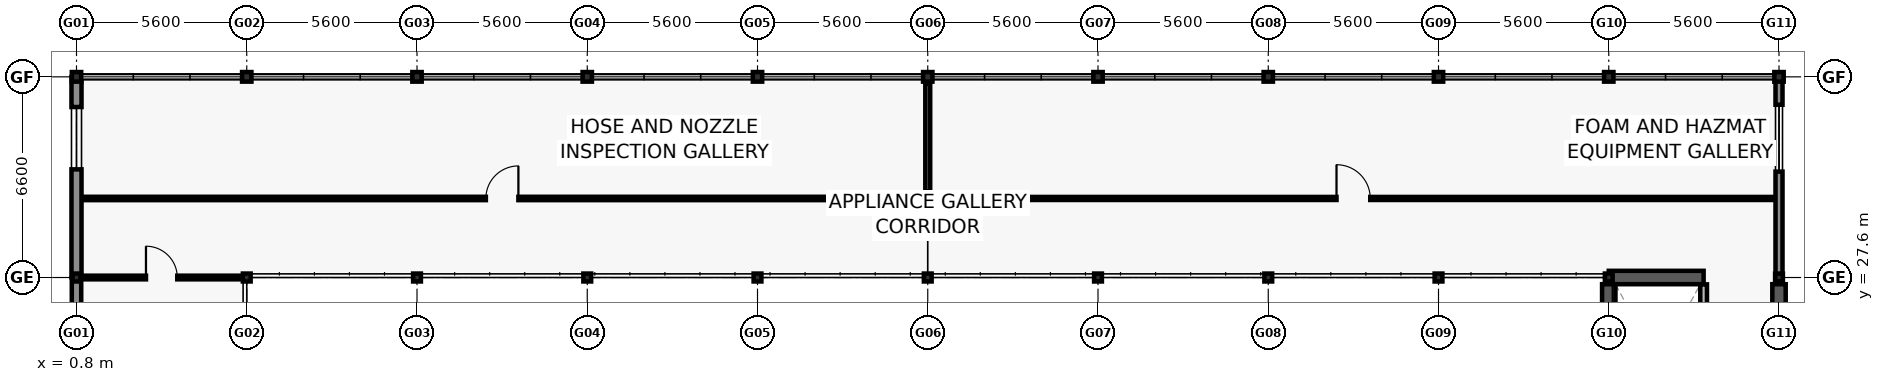
"""IFC4 building model, lengths in metres.
Left out: names, types, materials, properties, quantities, classifications, styles, units other than length and angle.
Written with IfcOpenShell. Run it as: python <this file> out.ifc"""

import sys

from ifc_helpers import new_model, si_unit, direction, frame, frame_2d, origin, origin_2d, place, context, subcontext, project, spatial, rectangle, i_section, extrude, element, fill, save


model = new_model("IFC4")
c1 = context("Model", 3, precision=1e-05, world=origin(), true_north=direction((0.0, 1.0)))
c2 = subcontext(c1, "Body", "Model", "MODEL_VIEW")
j1 = project(units=[si_unit("LENGTHUNIT", "METRE"), si_unit("PLANEANGLEUNIT", "RADIAN")], contexts=[c1])
p1 = place(None, origin())
s1 = spatial("IfcSite", under=j1, at=p1, CompositionType="ELEMENT")
p2 = place(p1, origin())
s2 = spatial("IfcBuilding", under=s1, at=p2, CompositionType="ELEMENT")
p3 = place(p2, frame((0.0, 0.0, 5.4)))
s3 = spatial("IfcBuildingStorey", under=s2, at=p3, CompositionType="ELEMENT", Elevation=5.4)
p4 = place(p3, frame((0.8, 27.6, 0.0), z_axis=(0.0, 0.0, 1.0), x_axis=(1.0, 0.0, 0.0)))
e1 = element("IfcColumn", 1, at=p4, inside=s3, PredefinedType="COLUMN", context=c2, shape_type="SweptSolid", body=[
    extrude(i_section(OverallWidth=0.256, OverallDepth=0.26, WebThickness=0.01, FlangeThickness=0.017, FilletRadius=0.013, at=origin_2d()), origin(), (0.0, 0.0, 1.0), 4.2),
])
p5 = place(p3, frame((0.8, 34.2, 0.0), z_axis=(0.0, 0.0, 1.0), x_axis=(1.0, 0.0, 0.0)))
e2 = element("IfcColumn", 2, at=p5, inside=s3, PredefinedType="COLUMN", context=c2, shape_type="SweptSolid", body=[
    extrude(i_section(OverallWidth=0.307, OverallDepth=0.315, WebThickness=0.012, FlangeThickness=0.019, FilletRadius=0.017, at=origin_2d()), origin(), (0.0, 0.0, 1.0), 4.2),
])
p6 = place(p3, frame((6.4, 27.6, 0.0), z_axis=(0.0, 0.0, 1.0), x_axis=(1.0, 0.0, 0.0)))
e3 = element("IfcColumn", 3, at=p6, inside=s3, PredefinedType="COLUMN", context=c2, shape_type="SweptSolid", body=[
    extrude(i_section(OverallWidth=0.256, OverallDepth=0.26, WebThickness=0.01, FlangeThickness=0.017, FilletRadius=0.013, at=origin_2d()), origin(), (0.0, 0.0, 1.0), 4.2),
])
p7 = place(p3, frame((6.4, 34.2, 0.0), z_axis=(0.0, 0.0, 1.0), x_axis=(1.0, 0.0, 0.0)))
e4 = element("IfcColumn", 4, at=p7, inside=s3, PredefinedType="COLUMN", context=c2, shape_type="SweptSolid", body=[
    extrude(i_section(OverallWidth=0.307, OverallDepth=0.315, WebThickness=0.012, FlangeThickness=0.019, FilletRadius=0.017, at=origin_2d()), origin(), (0.0, 0.0, 1.0), 4.2),
])
p8 = place(p3, frame((12.0, 27.6, 0.0), z_axis=(0.0, 0.0, 1.0), x_axis=(1.0, 0.0, 0.0)))
e5 = element("IfcColumn", 5, at=p8, inside=s3, PredefinedType="COLUMN", context=c2, shape_type="SweptSolid", body=[
    extrude(i_section(OverallWidth=0.256, OverallDepth=0.26, WebThickness=0.01, FlangeThickness=0.017, FilletRadius=0.013, at=origin_2d()), origin(), (0.0, 0.0, 1.0), 4.2),
])
p9 = place(p3, frame((12.0, 34.2, 0.0), z_axis=(0.0, 0.0, 1.0), x_axis=(1.0, 0.0, 0.0)))
e6 = element("IfcColumn", 6, at=p9, inside=s3, PredefinedType="COLUMN", context=c2, shape_type="SweptSolid", body=[
    extrude(i_section(OverallWidth=0.307, OverallDepth=0.315, WebThickness=0.012, FlangeThickness=0.019, FilletRadius=0.017, at=origin_2d()), origin(), (0.0, 0.0, 1.0), 4.2),
])
p10 = place(p3, frame((17.6, 27.6, 0.0), z_axis=(0.0, 0.0, 1.0), x_axis=(1.0, 0.0, 0.0)))
e7 = element("IfcColumn", 7, at=p10, inside=s3, PredefinedType="COLUMN", context=c2, shape_type="SweptSolid", body=[
    extrude(i_section(OverallWidth=0.256, OverallDepth=0.26, WebThickness=0.01, FlangeThickness=0.017, FilletRadius=0.013, at=origin_2d()), origin(), (0.0, 0.0, 1.0), 4.2),
])
p11 = place(p3, frame((17.6, 34.2, 0.0), z_axis=(0.0, 0.0, 1.0), x_axis=(1.0, 0.0, 0.0)))
e8 = element("IfcColumn", 8, at=p11, inside=s3, PredefinedType="COLUMN", context=c2, shape_type="SweptSolid", body=[
    extrude(i_section(OverallWidth=0.307, OverallDepth=0.315, WebThickness=0.012, FlangeThickness=0.019, FilletRadius=0.017, at=origin_2d()), origin(), (0.0, 0.0, 1.0), 4.2),
])
p12 = place(p3, frame((23.2, 27.6, 0.0), z_axis=(0.0, 0.0, 1.0), x_axis=(1.0, 0.0, 0.0)))
e9 = element("IfcColumn", 9, at=p12, inside=s3, PredefinedType="COLUMN", context=c2, shape_type="SweptSolid", body=[
    extrude(i_section(OverallWidth=0.256, OverallDepth=0.26, WebThickness=0.01, FlangeThickness=0.017, FilletRadius=0.013, at=origin_2d()), origin(), (0.0, 0.0, 1.0), 4.2),
])
p13 = place(p3, frame((23.2, 34.2, 0.0), z_axis=(0.0, 0.0, 1.0), x_axis=(1.0, 0.0, 0.0)))
e10 = element("IfcColumn", 10, at=p13, inside=s3, PredefinedType="COLUMN", context=c2, shape_type="SweptSolid", body=[
    extrude(i_section(OverallWidth=0.307, OverallDepth=0.315, WebThickness=0.012, FlangeThickness=0.019, FilletRadius=0.017, at=origin_2d()), origin(), (0.0, 0.0, 1.0), 4.2),
])
p14 = place(p3, frame((28.8, 27.6, 0.0), z_axis=(0.0, 0.0, 1.0), x_axis=(1.0, 0.0, 0.0)))
e11 = element("IfcColumn", 11, at=p14, inside=s3, PredefinedType="COLUMN", context=c2, shape_type="SweptSolid", body=[
    extrude(i_section(OverallWidth=0.256, OverallDepth=0.26, WebThickness=0.01, FlangeThickness=0.017, FilletRadius=0.013, at=origin_2d()), origin(), (0.0, 0.0, 1.0), 4.2),
])
p15 = place(p3, frame((28.8, 34.2, 0.0), z_axis=(0.0, 0.0, 1.0), x_axis=(1.0, 0.0, 0.0)))
e12 = element("IfcColumn", 12, at=p15, inside=s3, PredefinedType="COLUMN", context=c2, shape_type="SweptSolid", body=[
    extrude(i_section(OverallWidth=0.307, OverallDepth=0.315, WebThickness=0.012, FlangeThickness=0.019, FilletRadius=0.017, at=origin_2d()), origin(), (0.0, 0.0, 1.0), 4.2),
])
p16 = place(p3, frame((34.4, 27.6, 0.0), z_axis=(0.0, 0.0, 1.0), x_axis=(1.0, 0.0, 0.0)))
e13 = element("IfcColumn", 13, at=p16, inside=s3, PredefinedType="COLUMN", context=c2, shape_type="SweptSolid", body=[
    extrude(i_section(OverallWidth=0.256, OverallDepth=0.26, WebThickness=0.01, FlangeThickness=0.017, FilletRadius=0.013, at=origin_2d()), origin(), (0.0, 0.0, 1.0), 4.2),
])
p17 = place(p3, frame((34.4, 34.2, 0.0), z_axis=(0.0, 0.0, 1.0), x_axis=(1.0, 0.0, 0.0)))
e14 = element("IfcColumn", 14, at=p17, inside=s3, PredefinedType="COLUMN", context=c2, shape_type="SweptSolid", body=[
    extrude(i_section(OverallWidth=0.307, OverallDepth=0.315, WebThickness=0.012, FlangeThickness=0.019, FilletRadius=0.017, at=origin_2d()), origin(), (0.0, 0.0, 1.0), 4.2),
])
p18 = place(p3, frame((40.0, 27.6, 0.0), z_axis=(0.0, 0.0, 1.0), x_axis=(1.0, 0.0, 0.0)))
e15 = element("IfcColumn", 15, at=p18, inside=s3, PredefinedType="COLUMN", context=c2, shape_type="SweptSolid", body=[
    extrude(i_section(OverallWidth=0.256, OverallDepth=0.26, WebThickness=0.01, FlangeThickness=0.017, FilletRadius=0.013, at=origin_2d()), origin(), (0.0, 0.0, 1.0), 4.2),
])
p19 = place(p3, frame((40.0, 34.2, 0.0), z_axis=(0.0, 0.0, 1.0), x_axis=(1.0, 0.0, 0.0)))
e16 = element("IfcColumn", 16, at=p19, inside=s3, PredefinedType="COLUMN", context=c2, shape_type="SweptSolid", body=[
    extrude(i_section(OverallWidth=0.307, OverallDepth=0.315, WebThickness=0.012, FlangeThickness=0.019, FilletRadius=0.017, at=origin_2d()), origin(), (0.0, 0.0, 1.0), 4.2),
])
p20 = place(p3, frame((45.6, 27.6, 0.0), z_axis=(0.0, 0.0, 1.0), x_axis=(1.0, 0.0, 0.0)))
e17 = element("IfcColumn", 17, at=p20, inside=s3, PredefinedType="COLUMN", context=c2, shape_type="SweptSolid", body=[
    extrude(i_section(OverallWidth=0.256, OverallDepth=0.26, WebThickness=0.01, FlangeThickness=0.017, FilletRadius=0.013, at=origin_2d()), origin(), (0.0, 0.0, 1.0), 4.2),
])
p21 = place(p3, frame((45.6, 34.2, 0.0), z_axis=(0.0, 0.0, 1.0), x_axis=(1.0, 0.0, 0.0)))
e18 = element("IfcColumn", 18, at=p21, inside=s3, PredefinedType="COLUMN", context=c2, shape_type="SweptSolid", body=[
    extrude(i_section(OverallWidth=0.307, OverallDepth=0.315, WebThickness=0.012, FlangeThickness=0.019, FilletRadius=0.017, at=origin_2d()), origin(), (0.0, 0.0, 1.0), 4.2),
])
p22 = place(p3, frame((51.2, 27.6, 0.0), z_axis=(0.0, 0.0, 1.0), x_axis=(1.0, 0.0, 0.0)))
e19 = element("IfcColumn", 19, at=p22, inside=s3, PredefinedType="COLUMN", context=c2, shape_type="SweptSolid", body=[
    extrude(i_section(OverallWidth=0.256, OverallDepth=0.26, WebThickness=0.01, FlangeThickness=0.017, FilletRadius=0.013, at=origin_2d()), origin(), (0.0, 0.0, 1.0), 4.2),
])
p23 = place(p3, frame((51.2, 34.2, 0.0), z_axis=(0.0, 0.0, 1.0), x_axis=(1.0, 0.0, 0.0)))
e20 = element("IfcColumn", 20, at=p23, inside=s3, PredefinedType="COLUMN", context=c2, shape_type="SweptSolid", body=[
    extrude(i_section(OverallWidth=0.307, OverallDepth=0.315, WebThickness=0.012, FlangeThickness=0.019, FilletRadius=0.017, at=origin_2d()), origin(), (0.0, 0.0, 1.0), 4.2),
])
p24 = place(p3, frame((56.8, 27.6, 0.0), z_axis=(0.0, 0.0, 1.0), x_axis=(1.0, 0.0, 0.0)))
e21 = element("IfcColumn", 21, at=p24, inside=s3, PredefinedType="COLUMN", context=c2, shape_type="SweptSolid", body=[
    extrude(i_section(OverallWidth=0.256, OverallDepth=0.26, WebThickness=0.01, FlangeThickness=0.017, FilletRadius=0.013, at=origin_2d()), origin(), (0.0, 0.0, 1.0), 4.2),
])
p25 = place(p3, frame((56.8, 34.2, 0.0), z_axis=(0.0, 0.0, 1.0), x_axis=(1.0, 0.0, 0.0)))
e22 = element("IfcColumn", 22, at=p25, inside=s3, PredefinedType="COLUMN", context=c2, shape_type="SweptSolid", body=[
    extrude(i_section(OverallWidth=0.307, OverallDepth=0.315, WebThickness=0.012, FlangeThickness=0.019, FilletRadius=0.017, at=origin_2d()), origin(), (0.0, 0.0, 1.0), 4.2),
])
p26 = place(p3, frame((51.2, 27.6, 0.0), z_axis=(0.0, 0.0, 1.0), x_axis=(1.0, 0.0, 0.0)))
e23 = element("IfcWall", 23, at=p26, inside=s3, PredefinedType="SHEAR", context=c2, shape_type="SweptSolid", body=[
    extrude(rectangle(XDim=3.12, YDim=0.44, at=frame_2d((1.56, 0.0))), origin(), (0.0, 0.0, 1.0), 3.96),
])
for number, where, z_axis, x_axis in (
    (24, (51.2, 21.0, 0.0), (0.0, 0.0, 1.0), (0.0, 1.0, 0.0)),
    (25, (56.8, 21.0, 0.0), (0.0, 0.0, 1.0), (0.0, 1.0, 0.0)),
):
    element("IfcWall", number, at=place(p3, frame(where, z_axis=z_axis, x_axis=x_axis)), inside=s3, PredefinedType="SHEAR", context=c2, shape_type="SweptSolid", body=[
        extrude(rectangle(XDim=6.38, YDim=0.44, at=frame_2d((3.19, 0.0))), origin(), (0.0, 0.0, 1.0), 3.96),
    ])
p27 = place(p3, frame((0.8, 21.005, 0.0), z_axis=(0.0, 0.0, 1.0), x_axis=(0.0, 1.0, 0.0)))
e26 = element("IfcWall", 26, at=p27, inside=s3, PredefinedType="SOLIDWALL", context=c2, shape_type="SweptSolid", body=[
    extrude(rectangle(XDim=6.59, YDim=0.31, at=frame_2d((3.295, 0.0))), origin(), (0.0, 0.0, 1.0), 3.32),
])
p28 = place(p27, frame((0.962, 0.0, 0.8)))
e27 = element("IfcOpeningElement", 27, at=p28, cuts=e26, PredefinedType="OPENING", context=c2, shape_type="SweptSolid", body=[
    extrude(rectangle(XDim=1.9, YDim=1.8, at=frame_2d((0.95, 0.9))), frame((0.0, 0.165, 0.0), z_axis=(0.0, -1.0, 0.0), x_axis=(1.0, 0.0, 0.0)), (0.0, 0.0, 1.0), 0.33),
])
p29 = place(p3, frame((0.8, 27.605, 0.0), z_axis=(0.0, 0.0, 1.0), x_axis=(0.0, 1.0, 0.0)))
e28 = element("IfcWall", 28, at=p29, inside=s3, PredefinedType="SOLIDWALL", context=c2, shape_type="SweptSolid", body=[
    extrude(rectangle(XDim=6.59, YDim=0.33, at=frame_2d((3.295, 0.0))), origin(), (0.0, 0.0, 1.0), 3.32),
])
p30 = place(p29, frame((3.552, 0.0, 0.8)))
e29 = element("IfcOpeningElement", 29, at=p30, cuts=e28, PredefinedType="OPENING", context=c2, shape_type="SweptSolid", body=[
    extrude(rectangle(XDim=2.05, YDim=1.8, at=frame_2d((1.025, 0.9))), frame((0.0, 0.175, 0.0), z_axis=(0.0, -1.0, 0.0), x_axis=(1.0, 0.0, 0.0)), (0.0, 0.0, 1.0), 0.35),
])
p31 = place(p3, frame((56.8, 34.195, 0.0), z_axis=(0.0, 0.0, 1.0), x_axis=(0.0, -1.0, 0.0)))
e30 = element("IfcWall", 30, at=p31, inside=s3, PredefinedType="SOLIDWALL", context=c2, shape_type="SweptSolid", body=[
    extrude(rectangle(XDim=6.59, YDim=0.23, at=frame_2d((3.295, 0.0))), origin(), (0.0, 0.0, 1.0), 3.32),
])
p32 = place(p31, frame((0.913, 0.0, 0.8)))
e31 = element("IfcOpeningElement", 31, at=p32, cuts=e30, PredefinedType="OPENING", context=c2, shape_type="SweptSolid", body=[
    extrude(rectangle(XDim=2.2, YDim=1.8, at=frame_2d((1.1, 0.9))), frame((0.0, 0.125, 0.0), z_axis=(0.0, -1.0, 0.0), x_axis=(1.0, 0.0, 0.0)), (0.0, 0.0, 1.0), 0.25),
])
p33 = place(p3, frame((54.32, 21.12, 0.0), z_axis=(0.0, 0.0, 1.0), x_axis=(0.0, 1.0, 0.0)))
e32 = element("IfcWall", 32, at=p33, inside=s3, PredefinedType="SOLIDWALL", context=c2, shape_type="SweptSolid", body=[
    extrude(rectangle(XDim=6.255, YDim=0.22, at=frame_2d((3.127, 0.0))), origin(), (0.0, 0.0, 1.0), 3.96),
])
p34 = place(p3, frame((1.02, 27.6, 0.0), z_axis=(0.0, 0.0, 1.0), x_axis=(1.0, 0.0, 0.0)))
e33 = element("IfcWall", 33, at=p34, inside=s3, PredefinedType="PARTITIONING", context=c2, shape_type="SweptSolid", body=[
    extrude(rectangle(XDim=5.16, YDim=0.12, at=frame_2d((2.58, 0.0))), origin(), (0.0, 0.0, 1.0), 3.3),
])
p35 = place(p34, frame((2.065, 0.0, 0.0)))
e34 = element("IfcOpeningElement", 34, at=p35, cuts=e33, PredefinedType="OPENING", context=c2, shape_type="SweptSolid", body=[
    extrude(rectangle(XDim=1.03, YDim=2.06, at=frame_2d((0.515, 1.03))), frame((0.0, 0.07, 0.0), z_axis=(0.0, -1.0, 0.0), x_axis=(1.0, 0.0, 0.0)), (0.0, 0.0, 1.0), 0.14),
])
p36 = place(p3, frame((1.02, 30.2, 0.0), z_axis=(0.0, 0.0, 1.0), x_axis=(1.0, 0.0, 0.0)))
e35 = element("IfcWall", 35, at=p36, inside=s3, PredefinedType="PARTITIONING", context=c2, shape_type="SweptSolid", body=[
    extrude(rectangle(XDim=27.56, YDim=0.11, at=frame_2d((13.78, 0.0))), origin(), (0.0, 0.0, 1.0), 3.3),
])
p37 = place(p36, frame((13.245, 0.0, 0.0)))
e36 = element("IfcOpeningElement", 36, at=p37, cuts=e35, PredefinedType="OPENING", context=c2, shape_type="SweptSolid", body=[
    extrude(rectangle(XDim=1.07, YDim=2.08, at=frame_2d((0.535, 1.04))), frame((0.0, 0.065, 0.0), z_axis=(0.0, -1.0, 0.0), x_axis=(1.0, 0.0, 0.0)), (0.0, 0.0, 1.0), 0.13),
])
p38 = place(p3, frame((29.02, 30.2, 0.0), z_axis=(0.0, 0.0, 1.0), x_axis=(1.0, 0.0, 0.0)))
e37 = element("IfcWall", 37, at=p38, inside=s3, PredefinedType="PARTITIONING", context=c2, shape_type="SweptSolid", body=[
    extrude(rectangle(XDim=27.56, YDim=0.1, at=frame_2d((13.78, 0.0))), origin(), (0.0, 0.0, 1.0), 3.3),
])
p39 = place(p38, frame((13.225, 0.0, 0.0)))
e38 = element("IfcOpeningElement", 38, at=p39, cuts=e37, PredefinedType="OPENING", context=c2, shape_type="SweptSolid", body=[
    extrude(rectangle(XDim=1.11, YDim=2.1, at=frame_2d((0.555, 1.05))), frame((0.0, 0.06, 0.0), z_axis=(0.0, -1.0, 0.0), x_axis=(1.0, 0.0, 0.0)), (0.0, 0.0, 1.0), 0.12),
])
p40 = place(p3, frame((28.8, 30.42, 0.0), z_axis=(0.0, 0.0, 1.0), x_axis=(0.0, 1.0, 0.0)))
e39 = element("IfcWall", 39, at=p40, inside=s3, PredefinedType="PARTITIONING", context=c2, shape_type="SweptSolid", body=[
    extrude(rectangle(XDim=3.56, YDim=0.16, at=frame_2d((1.78, 0.0))), origin(), (0.0, 0.0, 1.0), 3.3),
])
p41 = place(p30, origin())
e40 = element("IfcWindow", 40, at=p41, inside=s3, PartitioningType="DOUBLE_PANEL_VERTICAL", PredefinedType="WINDOW", context=c2, shape_type="SweptSolid", body=[
    extrude(rectangle(XDim=2.05, YDim=1.8, at=frame_2d((1.025, 0.9))), frame((0.0, 0.03, 0.0), z_axis=(0.0, -1.0, 0.0), x_axis=(1.0, 0.0, 0.0)), (0.0, 0.0, 1.0), 0.06),
])
fill(e29, e40)
p42 = place(p32, origin())
e41 = element("IfcWindow", 41, at=p42, inside=s3, PartitioningType="DOUBLE_PANEL_VERTICAL", PredefinedType="WINDOW", context=c2, shape_type="SweptSolid", body=[
    extrude(rectangle(XDim=2.2, YDim=1.8, at=frame_2d((1.1, 0.9))), frame((0.0, 0.03, 0.0), z_axis=(0.0, -1.0, 0.0), x_axis=(1.0, 0.0, 0.0)), (0.0, 0.0, 1.0), 0.06),
])
fill(e31, e41)
p43 = place(p35, origin())
e42 = element("IfcDoor", 42, at=p43, inside=s3, OperationType="SINGLE_SWING_LEFT", PredefinedType="DOOR", context=c2, shape_type="SweptSolid", body=[
    extrude(rectangle(XDim=1.03, YDim=2.06, at=frame_2d((0.515, 1.03))), frame((0.0, 0.025, 0.0), z_axis=(0.0, -1.0, 0.0), x_axis=(1.0, 0.0, 0.0)), (0.0, 0.0, 1.0), 0.05),
])
fill(e34, e42)
p44 = place(p37, origin())
e43 = element("IfcDoor", 43, at=p44, inside=s3, OperationType="SINGLE_SWING_RIGHT", PredefinedType="DOOR", context=c2, shape_type="SweptSolid", body=[
    extrude(rectangle(XDim=1.07, YDim=2.08, at=frame_2d((0.535, 1.04))), frame((0.0, 0.025, 0.0), z_axis=(0.0, -1.0, 0.0), x_axis=(1.0, 0.0, 0.0)), (0.0, 0.0, 1.0), 0.05),
])
fill(e36, e43)
p45 = place(p39, origin())
e44 = element("IfcDoor", 44, at=p45, inside=s3, OperationType="SINGLE_SWING_LEFT", PredefinedType="DOOR", context=c2, shape_type="SweptSolid", body=[
    extrude(rectangle(XDim=1.11, YDim=2.1, at=frame_2d((0.555, 1.05))), frame((0.0, 0.025, 0.0), z_axis=(0.0, -1.0, 0.0), x_axis=(1.0, 0.0, 0.0)), (0.0, 0.0, 1.0), 0.05),
])
fill(e38, e44)
save(model, sys.argv[1])
